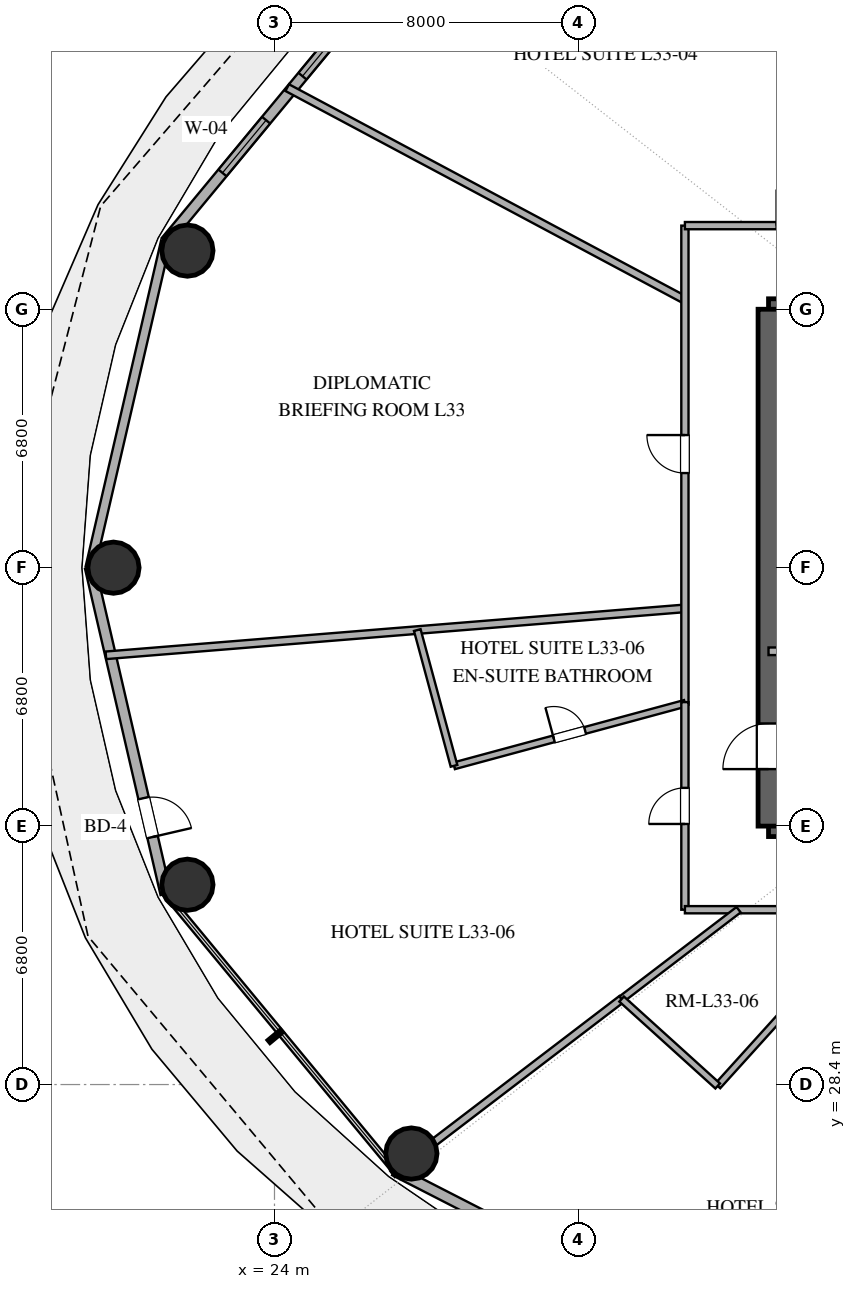
"""IFC4 building model, lengths in metres.
Left out: names, types, materials, properties, quantities, classifications, styles, units other than length and angle.
Written with IfcOpenShell. Run it as: python <this file> out.ifc"""

import sys

from ifc_helpers import new_model, si_unit, direction, frame, frame_2d, origin, origin_2d, place, context, subcontext, project, spatial, rectangle, hollow_circle, extrude, element, fill, save


model = new_model("IFC4")
c1 = context("Model", 3, precision=1e-05, world=origin(), true_north=direction((0.0, 1.0)))
c2 = subcontext(c1, "Body", "Model", "MODEL_VIEW")
j1 = project(units=[si_unit("LENGTHUNIT", "METRE"), si_unit("PLANEANGLEUNIT", "RADIAN")], contexts=[c1])
p1 = place(None, origin())
s1 = spatial("IfcSite", under=j1, at=p1, CompositionType="ELEMENT")
p2 = place(p1, origin())
s2 = spatial("IfcBuilding", under=s1, at=p2, CompositionType="ELEMENT")
p3 = place(p2, frame((0.0, 0.0, 130.8)))
s3 = spatial("IfcBuildingStorey", under=s2, at=p3, CompositionType="ELEMENT", Elevation=130.8)
for number, where, z_axis, x_axis in (
    (1, (37.0, 35.2, 0.0), (0.0, 0.0, 1.0), (1.0, 0.0, 0.0)),
    (2, (37.0, 48.8, 0.0), (0.0, 0.0, 1.0), (1.0, 0.0, 0.0)),
):
    element("IfcWall", number, at=place(p3, frame(where, z_axis=z_axis, x_axis=x_axis)), inside=s3, PredefinedType="SHEAR", context=c2, shape_type="SweptSolid", body=[
        extrude(rectangle(XDim=4.0, YDim=0.55, at=frame_2d((2.0, 0.0))), origin(), (0.0, 0.0, 1.0), 3.32),
    ])
p4 = place(p3, frame((37.0, 35.2, 0.0), z_axis=(0.0, 0.0, 1.0), x_axis=(0.0, 1.0, 0.0)))
e3 = element("IfcWall", 3, at=p4, inside=s3, PredefinedType="SHEAR", context=c2, shape_type="SweptSolid", body=[
    extrude(rectangle(XDim=13.6, YDim=0.55, at=frame_2d((6.8, 0.0))), origin(), (0.0, 0.0, 1.0), 3.32),
])
p5 = place(p4, frame((1.5, 0.0, 0.0)))
e4 = element("IfcOpeningElement", 4, at=p5, cuts=e3, PredefinedType="OPENING", context=c2, shape_type="SweptSolid", body=[
    extrude(rectangle(XDim=1.2, YDim=2.15, at=frame_2d((0.6, 1.075))), frame((0.0, 0.285, 0.0), z_axis=(0.0, -1.0, 0.0), x_axis=(1.0, 0.0, 0.0)), (0.0, 0.0, 1.0), 0.57),
])
for number, where, z_axis, x_axis in (
    (5, (21.709, 50.343, 0.0), (0.0, 0.0, 1.0), (1.0, 0.0, 0.0)),
    (6, (19.763, 42.0, 0.0), (0.0, 0.0, 1.0), (1.0, 0.0, 0.0)),
    (7, (21.709, 33.657, 0.0), (0.0, 0.0, 1.0), (1.0, 0.0, 0.0)),
    (8, (27.602, 26.585, 0.0), (0.0, 0.0, 1.0), (1.0, 0.0, 0.0)),
):
    element("IfcColumn", number, at=place(p3, frame(where, z_axis=z_axis, x_axis=x_axis)), inside=s3, PredefinedType="COLUMN", context=c2, shape_type="SweptSolid", body=[
        extrude(hollow_circle(Radius=0.675, WallThickness=0.036, at=origin_2d()), origin(), (0.0, 0.0, 1.0), 3.32),
    ])
p6 = place(p3, frame((27.16, 57.86, 0.0), z_axis=(0.0, 0.0, 1.0), x_axis=(-0.637505817448, -0.770445541696, 0.0)))
e9 = element("IfcWall", 9, at=p6, inside=s3, PredefinedType="SOLIDWALL", context=c2, shape_type="SweptSolid", body=[
    extrude(rectangle(XDim=9.445, YDim=0.28, at=frame_2d((4.723, 0.0))), origin(), (0.0, 0.0, 1.0), 3.32),
])
p7 = place(p6, frame((1.7, 0.0, 0.85)))
e10 = element("IfcOpeningElement", 10, at=p7, cuts=e9, PredefinedType="OPENING", context=c2, shape_type="SweptSolid", body=[
    extrude(rectangle(XDim=2.1, YDim=2.2, at=frame_2d((1.05, 1.1))), frame((0.0, 0.15, 0.0), z_axis=(0.0, -1.0, 0.0), x_axis=(1.0, 0.0, 0.0)), (0.0, 0.0, 1.0), 0.3),
])
p8 = place(p6, frame((5.303, 0.0, 0.85)))
e11 = element("IfcOpeningElement", 11, at=p8, cuts=e9, PredefinedType="OPENING", context=c2, shape_type="SweptSolid", body=[
    extrude(rectangle(XDim=1.8, YDim=2.2, at=frame_2d((0.9, 1.1))), frame((0.0, 0.15, 0.0), z_axis=(0.0, -1.0, 0.0), x_axis=(1.0, 0.0, 0.0)), (0.0, 0.0, 1.0), 0.3),
])
p9 = place(p3, frame((21.139, 50.583, 0.0), z_axis=(0.0, 0.0, 1.0), x_axis=(-0.22558597182, -0.974223264616, 0.0)))
e12 = element("IfcWall", 12, at=p9, inside=s3, PredefinedType="SOLIDWALL", context=c2, shape_type="SweptSolid", body=[
    extrude(rectangle(XDim=8.811, YDim=0.25, at=frame_2d((4.405, 0.0))), origin(), (0.0, 0.0, 1.0), 3.32),
])
p10 = place(p3, frame((19.151, 42.0, 0.0), z_axis=(0.0, 0.0, 1.0), x_axis=(0.22558597182, -0.974223264616, 0.0)))
e13 = element("IfcWall", 13, at=p10, inside=s3, PredefinedType="SOLIDWALL", context=c2, shape_type="SweptSolid", body=[
    extrude(rectangle(XDim=8.811, YDim=0.28, at=frame_2d((4.405, 0.0))), origin(), (0.0, 0.0, 1.0), 3.32),
])
p11 = place(p10, frame((6.225, 0.0, 0.0)))
e14 = element("IfcOpeningElement", 14, at=p11, cuts=e13, PredefinedType="OPENING", context=c2, shape_type="SweptSolid", body=[
    extrude(rectangle(XDim=1.05, YDim=2.2, at=frame_2d((0.525, 1.1))), frame((0.0, 0.15, 0.0), z_axis=(0.0, -1.0, 0.0), x_axis=(1.0, 0.0, 0.0)), (0.0, 0.0, 1.0), 0.3),
])
p12 = place(p3, frame((27.16, 26.14, 0.0), z_axis=(0.0, 0.0, 1.0), x_axis=(0.889959505023, -0.45603955905, 0.0)))
e15 = element("IfcWall", 15, at=p12, inside=s3, PredefinedType="SOLIDWALL", context=c2, shape_type="SweptSolid", body=[
    extrude(rectangle(XDim=10.662, YDim=0.28, at=frame_2d((5.331, 0.0))), origin(), (0.0, 0.0, 1.0), 3.32),
])
p13 = place(p12, frame((3.131, 0.0, 0.85)))
e16 = element("IfcOpeningElement", 16, at=p13, cuts=e15, PredefinedType="OPENING", context=c2, shape_type="SweptSolid", body=[
    extrude(rectangle(XDim=1.5, YDim=1.8, at=frame_2d((0.75, 0.9))), frame((0.0, 0.15, 0.0), z_axis=(0.0, -1.0, 0.0), x_axis=(1.0, 0.0, 0.0)), (0.0, 0.0, 1.0), 0.3),
])
p14 = place(p12, frame((6.171, 0.0, 0.85)))
e17 = element("IfcOpeningElement", 17, at=p14, cuts=e15, PredefinedType="OPENING", context=c2, shape_type="SweptSolid", body=[
    extrude(rectangle(XDim=1.5, YDim=1.8, at=frame_2d((0.75, 0.9))), frame((0.0, 0.15, 0.0), z_axis=(0.0, -1.0, 0.0), x_axis=(1.0, 0.0, 0.0)), (0.0, 0.0, 1.0), 0.3),
])
p15 = place(p3, frame((37.0, 39.8, 0.0), z_axis=(0.0, 0.0, 1.0), x_axis=(1.0, 0.0, 0.0)))
e18 = element("IfcWall", 18, at=p15, inside=s3, PredefinedType="SOLIDWALL", context=c2, shape_type="SweptSolid", body=[
    extrude(rectangle(XDim=4.0, YDim=0.2, at=frame_2d((2.0, 0.0))), origin(), (0.0, 0.0, 1.0), 2.68),
])
p16 = place(p15, frame((1.45, 0.0, 0.0)))
e19 = element("IfcOpeningElement", 19, at=p16, cuts=e18, PredefinedType="OPENING", context=c2, shape_type="SweptSolid", body=[
    extrude(rectangle(XDim=1.1, YDim=2.15, at=frame_2d((0.55, 1.075))), frame((0.0, 0.11, 0.0), z_axis=(0.0, -1.0, 0.0), x_axis=(1.0, 0.0, 0.0)), (0.0, 0.0, 1.0), 0.22),
])
p17 = place(p3, frame((24.335, 54.631, 0.0), z_axis=(0.0, 0.0, 1.0), x_axis=(0.882197358086, -0.470879837524, 0.0)))
e20 = element("IfcWall", 20, at=p17, inside=s3, PredefinedType="PARTITIONING", context=c2, shape_type="SweptSolid", body=[
    extrude(rectangle(XDim=11.862, YDim=0.2, at=frame_2d((5.931, 0.0))), origin(), (0.0, 0.0, 1.0), 2.68),
])
p18 = place(p3, frame((34.8, 40.929, 0.0), z_axis=(0.0, 0.0, 1.0), x_axis=(-0.996728109279, -0.080827446901, 0.0)))
e21 = element("IfcWall", 21, at=p18, inside=s3, PredefinedType="PARTITIONING", context=c2, shape_type="SweptSolid", body=[
    extrude(rectangle(XDim=15.287, YDim=0.2, at=frame_2d((7.644, 0.0))), origin(), (0.0, 0.0, 1.0), 2.68),
])
p19 = place(p3, frame((34.8, 38.396, 0.0), z_axis=(0.0, 0.0, 1.0), x_axis=(0.0, 1.0, 0.0)))
e22 = element("IfcWall", 22, at=p19, inside=s3, PredefinedType="PARTITIONING", context=c2, shape_type="SweptSolid", body=[
    extrude(rectangle(XDim=12.604, YDim=0.19, at=frame_2d((6.302, 0.0))), origin(), (0.0, 0.0, 1.0), 2.68),
])
p20 = place(p19, frame((6.094, 0.0, 0.0)))
e23 = element("IfcOpeningElement", 23, at=p20, cuts=e22, PredefinedType="OPENING", context=c2, shape_type="SweptSolid", body=[
    extrude(rectangle(XDim=1.0, YDim=2.2, at=frame_2d((0.5, 1.1))), frame((0.0, 0.105, 0.0), z_axis=(0.0, -1.0, 0.0), x_axis=(1.0, 0.0, 0.0)), (0.0, 0.0, 1.0), 0.21),
])
p21 = place(p3, frame((27.105, 26.046, 0.0), z_axis=(0.0, 0.0, 1.0), x_axis=(0.794798861724, 0.606872943376, 0.0)))
e24 = element("IfcWall", 24, at=p21, inside=s3, PredefinedType="PARTITIONING", context=c2, shape_type="SweptSolid", body=[
    extrude(rectangle(XDim=7.586, YDim=0.2, at=frame_2d((3.793, 0.0))), origin(), (0.0, 0.0, 1.0), 2.68),
])
p22 = place(p3, frame((42.974, 51.0, 0.0), z_axis=(0.0, 0.0, 1.0), x_axis=(-0.487587337482, 0.873074216964, 0.0)))
e25 = element("IfcWall", 25, at=p22, inside=s3, PredefinedType="PARTITIONING", context=c2, shape_type="SweptSolid", body=[
    extrude(rectangle(XDim=13.446, YDim=0.2, at=frame_2d((6.723, 0.0))), origin(), (0.0, 0.0, 1.0), 2.68),
])
p23 = place(p3, frame((28.724, 36.786, 0.0), z_axis=(0.0, 0.0, 1.0), x_axis=(0.965306865657, 0.261118086535, 0.0)))
e26 = element("IfcWall", 26, at=p23, inside=s3, PredefinedType="PLUMBINGWALL", context=c2, shape_type="SweptSolid", body=[
    extrude(rectangle(XDim=6.294, YDim=0.18, at=frame_2d((3.147, 0.0))), origin(), (0.0, 0.0, 1.0), 2.68),
])
p24 = place(p23, frame((2.722, 0.0, 0.0)))
e27 = element("IfcOpeningElement", 27, at=p24, cuts=e26, PredefinedType="OPENING", context=c2, shape_type="SweptSolid", body=[
    extrude(rectangle(XDim=0.85, YDim=2.1, at=frame_2d((0.425, 1.05))), frame((0.0, 0.1, 0.0), z_axis=(0.0, -1.0, 0.0), x_axis=(1.0, 0.0, 0.0)), (0.0, 0.0, 1.0), 0.2),
])
p25 = place(p3, frame((39.857, 33.0, 0.0), z_axis=(0.0, 0.0, 1.0), x_axis=(-0.670890833363, -0.741556127147, 0.0)))
e28 = element("IfcWall", 28, at=p25, inside=s3, PredefinedType="PLUMBINGWALL", context=c2, shape_type="SweptSolid", body=[
    extrude(rectangle(XDim=6.253, YDim=0.18, at=frame_2d((3.127, 0.0))), origin(), (0.0, 0.0, 1.0), 2.68),
])
p26 = place(p25, frame((2.702, 0.0, 0.0)))
e29 = element("IfcOpeningElement", 29, at=p26, cuts=e28, PredefinedType="OPENING", context=c2, shape_type="SweptSolid", body=[
    extrude(rectangle(XDim=0.85, YDim=2.1, at=frame_2d((0.425, 1.05))), frame((0.0, 0.1, 0.0), z_axis=(0.0, -1.0, 0.0), x_axis=(1.0, 0.0, 0.0)), (0.0, 0.0, 1.0), 0.2),
])
p27 = place(p3, frame((34.8, 51.0, 0.0), z_axis=(0.0, 0.0, 1.0), x_axis=(1.0, 0.0, 0.0)))
e30 = element("IfcWall", 30, at=p27, inside=s3, PredefinedType="PARTITIONING", context=c2, shape_type="SweptSolid", body=[
    extrude(rectangle(XDim=8.21, YDim=0.19, at=frame_2d((4.105, 0.0))), origin(), (0.0, 0.0, 1.0), 2.68),
])
p28 = place(p27, frame((2.412, 0.0, 0.0)))
e31 = element("IfcOpeningElement", 31, at=p28, cuts=e30, PredefinedType="OPENING", context=c2, shape_type="SweptSolid", body=[
    extrude(rectangle(XDim=0.95, YDim=2.15, at=frame_2d((0.475, 1.075))), frame((0.0, 0.105, 0.0), z_axis=(0.0, -1.0, 0.0), x_axis=(1.0, 0.0, 0.0)), (0.0, 0.0, 1.0), 0.21),
])
p29 = place(p3, frame((34.8, 33.0, 0.0), z_axis=(0.0, 0.0, 1.0), x_axis=(0.0, 1.0, 0.0)))
e32 = element("IfcWall", 32, at=p29, inside=s3, PredefinedType="PARTITIONING", context=c2, shape_type="SweptSolid", body=[
    extrude(rectangle(XDim=5.463, YDim=0.19, at=frame_2d((2.731, 0.0))), origin(), (0.0, 0.0, 1.0), 2.68),
])
p30 = place(p29, frame((2.256, 0.0, 0.0)))
e33 = element("IfcOpeningElement", 33, at=p30, cuts=e32, PredefinedType="OPENING", context=c2, shape_type="SweptSolid", body=[
    extrude(rectangle(XDim=0.95, YDim=2.15, at=frame_2d((0.475, 1.075))), frame((0.0, 0.105, 0.0), z_axis=(0.0, -1.0, 0.0), x_axis=(1.0, 0.0, 0.0)), (0.0, 0.0, 1.0), 0.21),
])
p31 = place(p3, frame((51.914, 33.0, 0.0), z_axis=(0.0, 0.0, 1.0), x_axis=(-1.0, 0.0, 0.0)))
e34 = element("IfcWall", 34, at=p31, inside=s3, PredefinedType="PARTITIONING", context=c2, shape_type="SweptSolid", body=[
    extrude(rectangle(XDim=17.114, YDim=0.19, at=frame_2d((8.557, 0.0))), origin(), (0.0, 0.0, 1.0), 2.68),
])
p32 = place(p31, frame((4.021, 0.0, 0.0)))
e35 = element("IfcOpeningElement", 35, at=p32, cuts=e34, PredefinedType="OPENING", context=c2, shape_type="SweptSolid", body=[
    extrude(rectangle(XDim=1.0, YDim=2.2, at=frame_2d((0.5, 1.1))), frame((0.0, 0.105, 0.0), z_axis=(0.0, -1.0, 0.0), x_axis=(1.0, 0.0, 0.0)), (0.0, 0.0, 1.0), 0.21),
])
p33 = place(p31, frame((9.145, 0.0, 0.0)))
e36 = element("IfcOpeningElement", 36, at=p33, cuts=e34, PredefinedType="OPENING", context=c2, shape_type="SweptSolid", body=[
    extrude(rectangle(XDim=0.95, YDim=2.15, at=frame_2d((0.475, 1.075))), frame((0.0, 0.105, 0.0), z_axis=(0.0, -1.0, 0.0), x_axis=(1.0, 0.0, 0.0)), (0.0, 0.0, 1.0), 0.21),
])
p34 = place(p3, frame((33.135, 30.649, 0.0), z_axis=(0.0, 0.0, 1.0), x_axis=(0.794788820215, 0.606886094141, 0.0)))
e37 = element("IfcWall", 37, at=p34, inside=s3, PredefinedType="PLUMBINGWALL", context=c2, shape_type="SweptSolid", body=[
    extrude(rectangle(XDim=3.873, YDim=0.18, at=frame_2d((1.937, 0.0))), origin(), (0.0, 0.0, 1.0), 2.68),
])
p35 = place(p3, frame((27.758, 40.358, 0.0), z_axis=(0.0, 0.0, 1.0), x_axis=(0.261163229173, -0.96529465332, 0.0)))
e38 = element("IfcWall", 38, at=p35, inside=s3, PredefinedType="PLUMBINGWALL", context=c2, shape_type="SweptSolid", body=[
    extrude(rectangle(XDim=3.701, YDim=0.18, at=frame_2d((1.851, 0.0))), origin(), (0.0, 0.0, 1.0), 2.68),
])
p36 = place(p3, frame((35.662, 28.363, 0.0), z_axis=(0.0, 0.0, 1.0), x_axis=(-0.741571413778, 0.670873936196, 0.0)))
e39 = element("IfcWall", 39, at=p36, inside=s3, PredefinedType="PLUMBINGWALL", context=c2, shape_type="SweptSolid", body=[
    extrude(rectangle(XDim=3.408, YDim=0.18, at=frame_2d((1.704, 0.0))), origin(), (0.0, 0.0, 1.0), 2.68),
])
p37 = place(p7, origin())
e40 = element("IfcWindow", 40, at=p37, inside=s3, PartitioningType="SINGLE_PANEL", PredefinedType="WINDOW", context=c2, shape_type="SweptSolid", body=[
    extrude(rectangle(XDim=2.1, YDim=2.2, at=frame_2d((1.05, 1.1))), frame((0.0, 0.03, 0.0), z_axis=(0.0, -1.0, 0.0), x_axis=(1.0, 0.0, 0.0)), (0.0, 0.0, 1.0), 0.06),
])
fill(e10, e40)
p38 = place(p8, origin())
e41 = element("IfcWindow", 41, at=p38, inside=s3, PartitioningType="SINGLE_PANEL", PredefinedType="WINDOW", context=c2, shape_type="SweptSolid", body=[
    extrude(rectangle(XDim=1.8, YDim=2.2, at=frame_2d((0.9, 1.1))), frame((0.0, 0.03, 0.0), z_axis=(0.0, -1.0, 0.0), x_axis=(1.0, 0.0, 0.0)), (0.0, 0.0, 1.0), 0.06),
])
fill(e11, e41)
p39 = place(p11, origin())
e42 = element("IfcDoor", 42, at=p39, inside=s3, OperationType="SINGLE_SWING_RIGHT", PredefinedType="DOOR", context=c2, shape_type="SweptSolid", body=[
    extrude(rectangle(XDim=1.05, YDim=2.2, at=frame_2d((0.525, 1.1))), frame((0.0, 0.025, 0.0), z_axis=(0.0, -1.0, 0.0), x_axis=(1.0, 0.0, 0.0)), (0.0, 0.0, 1.0), 0.05),
])
fill(e14, e42)
p40 = place(p5, origin())
e43 = element("IfcDoor", 43, at=p40, inside=s3, OperationType="SINGLE_SWING_LEFT", PredefinedType="DOOR", context=c2, shape_type="SweptSolid", body=[
    extrude(rectangle(XDim=1.2, YDim=2.15, at=frame_2d((0.6, 1.075))), frame((0.0, 0.025, 0.0), z_axis=(0.0, -1.0, 0.0), x_axis=(1.0, 0.0, 0.0)), (0.0, 0.0, 1.0), 0.05),
])
fill(e4, e43)
p41 = place(p20, origin())
e44 = element("IfcDoor", 44, at=p41, inside=s3, OperationType="SINGLE_SWING_RIGHT", PredefinedType="DOOR", context=c2, shape_type="SweptSolid", body=[
    extrude(rectangle(XDim=1.0, YDim=2.2, at=frame_2d((0.5, 1.1))), frame((0.0, 0.025, 0.0), z_axis=(0.0, -1.0, 0.0), x_axis=(1.0, 0.0, 0.0)), (0.0, 0.0, 1.0), 0.05),
])
fill(e23, e44)
p42 = place(p24, origin())
e45 = element("IfcDoor", 45, at=p42, inside=s3, OperationType="SINGLE_SWING_LEFT", PredefinedType="DOOR", context=c2, shape_type="SweptSolid", body=[
    extrude(rectangle(XDim=0.85, YDim=2.1, at=frame_2d((0.425, 1.05))), frame((0.0, 0.025, 0.0), z_axis=(0.0, -1.0, 0.0), x_axis=(1.0, 0.0, 0.0)), (0.0, 0.0, 1.0), 0.05),
])
fill(e27, e45)
p43 = place(p28, origin())
e46 = element("IfcDoor", 46, at=p43, inside=s3, OperationType="SINGLE_SWING_LEFT", PredefinedType="DOOR", context=c2, shape_type="SweptSolid", body=[
    extrude(rectangle(XDim=0.95, YDim=2.15, at=frame_2d((0.475, 1.075))), frame((0.0, 0.025, 0.0), z_axis=(0.0, -1.0, 0.0), x_axis=(1.0, 0.0, 0.0)), (0.0, 0.0, 1.0), 0.05),
])
fill(e31, e46)
p44 = place(p30, origin())
e47 = element("IfcDoor", 47, at=p44, inside=s3, OperationType="SINGLE_SWING_LEFT", PredefinedType="DOOR", context=c2, shape_type="SweptSolid", body=[
    extrude(rectangle(XDim=0.95, YDim=2.15, at=frame_2d((0.475, 1.075))), frame((0.0, 0.025, 0.0), z_axis=(0.0, -1.0, 0.0), x_axis=(1.0, 0.0, 0.0)), (0.0, 0.0, 1.0), 0.05),
])
fill(e33, e47)
save(model, sys.argv[1])
